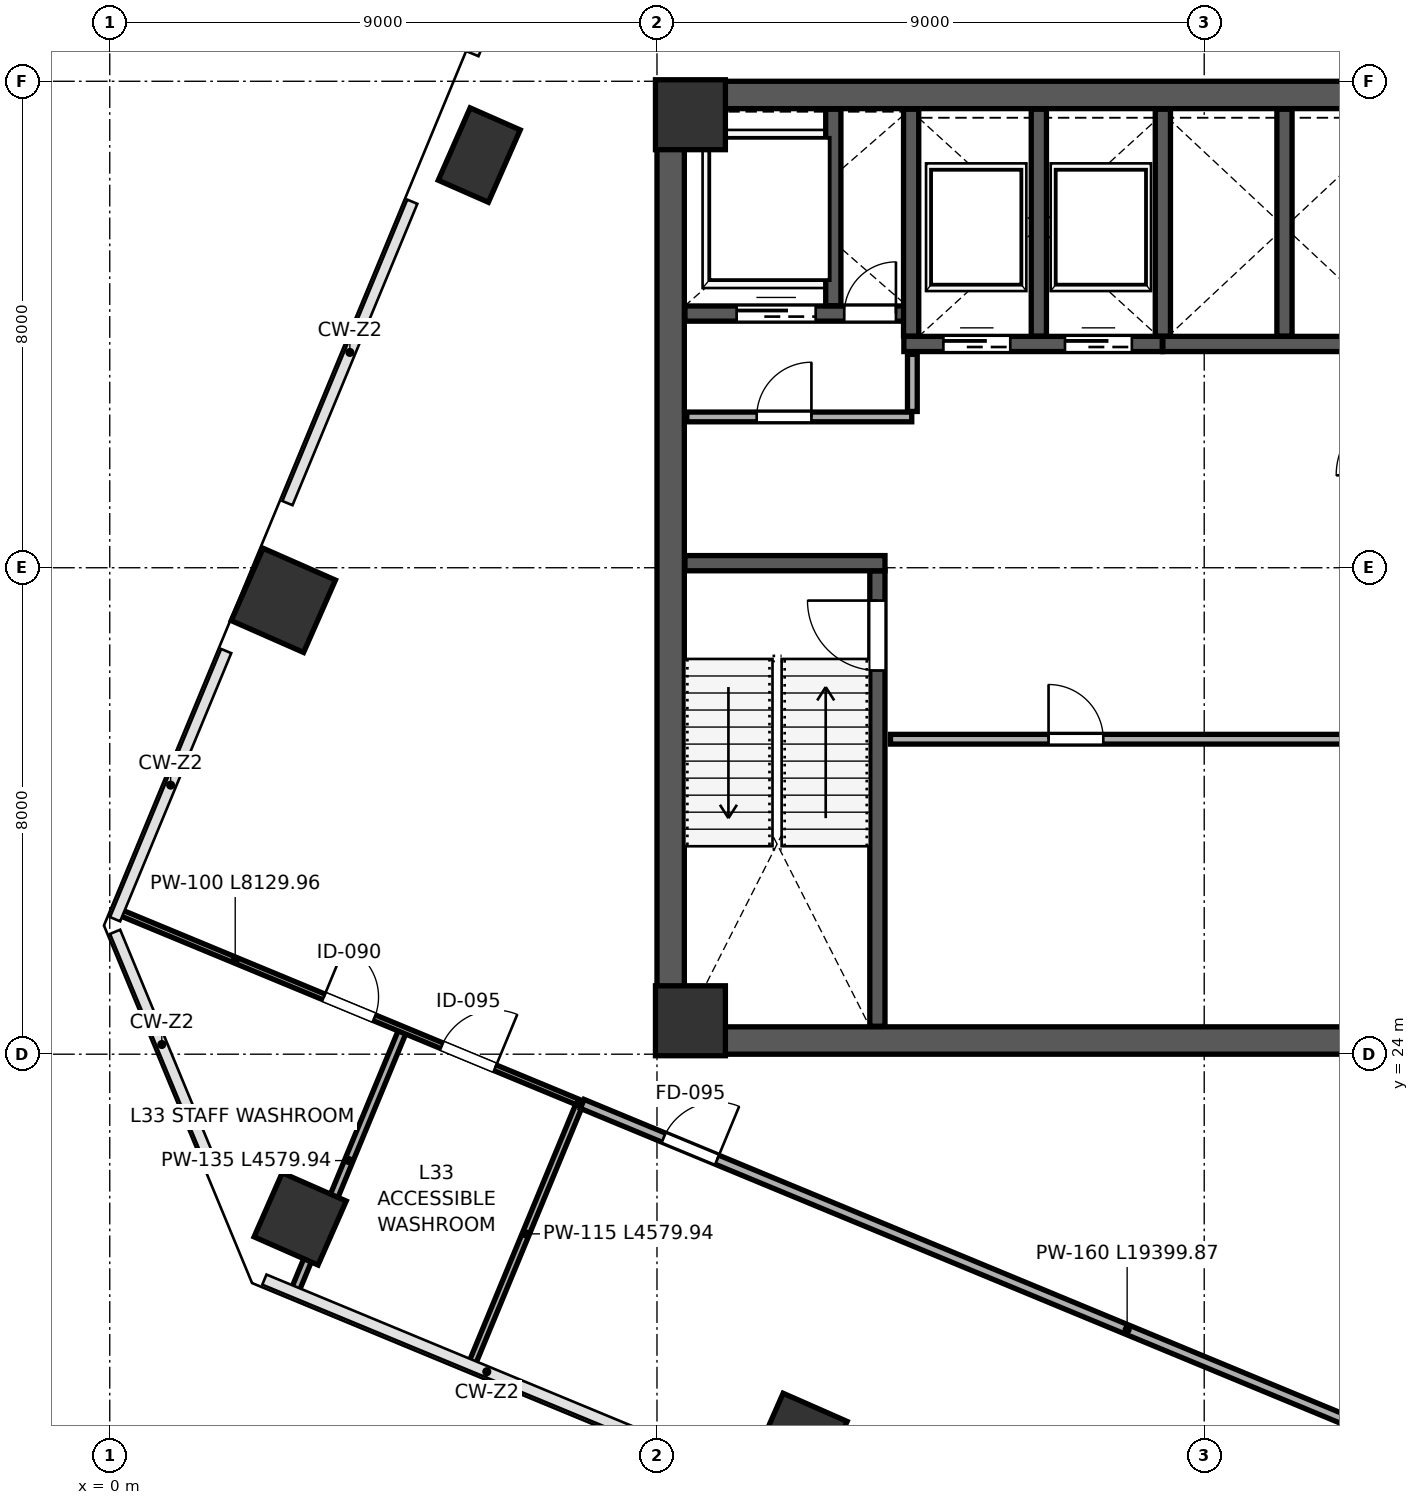
"""IFC4 building model, lengths in metres.
Left out: names, types, materials, properties, quantities, classifications, styles, units other than length and angle.
Written with IfcOpenShell. Run it as: python <this file> out.ifc"""

import sys

from ifc_helpers import new_model, si_unit, direction, frame, frame_2d, origin, origin_2d, place, context, subcontext, project, spatial, rectangle, extrude, clip, halfspace, source, transform, mapped, element, fill, save


model = new_model("IFC4")
c1 = context("Model", 3, precision=1e-05, world=origin(), true_north=direction((0.0, 1.0)))
c2 = subcontext(c1, "Body", "Model", "MODEL_VIEW")
j1 = project(units=[si_unit("LENGTHUNIT", "METRE"), si_unit("PLANEANGLEUNIT", "RADIAN")], contexts=[c1])
p1 = place(None, origin())
s1 = spatial("IfcSite", under=j1, at=p1, CompositionType="ELEMENT")
p2 = place(p1, origin())
s2 = spatial("IfcBuilding", under=s1, at=p2, CompositionType="ELEMENT")
p3 = place(p2, frame((0.0, 0.0, 149.8)))
s3 = spatial("IfcBuildingStorey", under=s2, at=p3, CompositionType="ELEMENT", Elevation=149.8)
m1 = source(origin(), c2, "Body", "SweptSolid", [
    extrude(rectangle(XDim=1.15, YDim=1.15, at=origin_2d()), origin(), (0.0, 0.0, 1.0), 4.198),
])
for number, where, z_axis, x_axis in (
    (1, (9.55, 24.55, 0.001), (0.0, 0.0, 1.0), (1.0, 0.0, 0.0)),
    (2, (9.55, 39.45, 0.001), (0.0, 0.0, 1.0), (1.0, 0.0, 0.0)),
):
    element("IfcColumn", number, at=place(p3, frame(where, z_axis=z_axis, x_axis=x_axis)), inside=s3, PredefinedType="COLUMN", context=c2, shape_type="MappedRepresentation", body=[
        mapped(m1, transform((0.0, 0.0, 0.0), scale=1.0)),
    ])
p4 = place(p3, frame((3.131, 21.291, 0.0), z_axis=(-0.054253829771, 0.095391983974, 0.993960206119), x_axis=(0.993538038075, 0.104540497944, 0.044197864073)))
e3 = element("IfcColumn", 3, at=p4, inside=s3, PredefinedType="COLUMN", context=c2, shape_type="Clipping", body=[
    clip(clip(extrude(rectangle(XDim=1.15, YDim=1.15, at=origin_2d()), origin(), (0.0, 0.0, 1.0), 4.226), halfspace(frame((0.0, 0.0, 0.084), z_axis=(0.0, 0.0, -1.0), x_axis=(1.0, 0.0, 0.0)), False)), halfspace(frame((0.0, 0.0, 4.141), z_axis=(0.0, 0.0, 1.0), x_axis=(1.0, 0.0, 0.0)), False)),
])
p5 = place(p3, frame((11.369, 17.666, 0.0), z_axis=(-0.073577292822, 0.053200261293, 0.995869526685), x_axis=(0.86133259686, 0.506723750126, 0.036567726806)))
e4 = element("IfcColumn", 4, at=p5, inside=s3, PredefinedType="COLUMN", context=c2, shape_type="Clipping", body=[
    clip(clip(extrude(rectangle(XDim=1.15, YDim=1.15, at=origin_2d()), origin(), (0.0, 0.0, 1.0), 4.217), halfspace(frame((0.0, 0.0, 0.07), z_axis=(0.0, 0.0, -1.0), x_axis=(1.0, 0.0, 0.0)), False)), halfspace(frame((0.0, 0.0, 4.147), z_axis=(0.0, 0.0, 1.0), x_axis=(1.0, 0.0, 0.0)), False)),
])
p6 = place(p3, frame((2.855, 31.464, 0.0), z_axis=(-0.001677900232, 0.096392475377, 0.995341989138), x_axis=(0.922149724139, -0.384879593254, 0.038827631481)))
e5 = element("IfcColumn", 5, at=p6, inside=s3, PredefinedType="COLUMN", context=c2, shape_type="Clipping", body=[
    clip(clip(extrude(rectangle(XDim=1.3, YDim=1.3, at=origin_2d()), origin(), (0.0, 0.0, 1.0), 4.22), halfspace(frame((0.0, 0.0, 0.084), z_axis=(0.0, 0.0, -1.0), x_axis=(1.0, 0.0, 0.0)), False)), halfspace(frame((0.0, 0.0, 4.136), z_axis=(0.0, 0.0, 1.0), x_axis=(1.0, 0.0, 0.0)), False)),
])
p7 = place(p3, frame((6.077, 38.786, 0.0), z_axis=(0.036018819674, 0.079391964265, 0.996192531913), x_axis=(0.667777192971, -0.743532643581, 0.035111657288)))
e6 = element("IfcColumn", 6, at=p7, inside=s3, PredefinedType="PILASTER", context=c2, shape_type="Clipping", body=[
    clip(clip(extrude(rectangle(XDim=0.9, YDim=1.3, at=origin_2d()), origin(), (0.0, 0.0, 1.0), 4.216), halfspace(frame((0.0, 0.0, 0.069), z_axis=(0.0, 0.0, -1.0), x_axis=(1.0, 0.0, 0.0)), False)), halfspace(frame((0.0, 0.0, 4.147), z_axis=(0.0, 0.0, 1.0), x_axis=(1.0, 0.0, 0.0)), False)),
])
p8 = place(p3, frame((9.225, 24.45, 0.0), z_axis=(0.0, 0.0, 1.0), x_axis=(0.0, 1.0, 0.0)))
e7 = element("IfcWall", 7, at=p8, inside=s3, PredefinedType="SHEAR", context=c2, shape_type="SweptSolid", body=[
    extrude(rectangle(XDim=15.1, YDim=0.45, at=frame_2d((7.55, 0.0))), origin(), (0.0, 0.0, 1.0), 3.96),
])
for number, where, z_axis, x_axis in (
    (8, (9.0, 24.225, 0.0), (0.0, 0.0, 1.0), (1.0, 0.0, 0.0)),
    (9, (9.0, 39.775, 0.0), (0.0, 0.0, 1.0), (1.0, 0.0, 0.0)),
):
    element("IfcWall", number, at=place(p3, frame(where, z_axis=z_axis, x_axis=x_axis)), inside=s3, PredefinedType="SHEAR", context=c2, shape_type="SweptSolid", body=[
        extrude(rectangle(XDim=18.0, YDim=0.45, at=frame_2d((9.0, 0.0))), origin(), (0.0, 0.0, 1.0), 3.96),
    ])
p9 = place(p3, frame((12.625, 24.46, 0.0), z_axis=(0.0, 0.0, 1.0), x_axis=(0.0, 1.0, 0.0)))
e10 = element("IfcWall", 10, at=p9, inside=s3, PredefinedType="SHEAR", context=c2, shape_type="SweptSolid", body=[
    extrude(rectangle(XDim=7.49, YDim=0.25, at=frame_2d((3.745, 0.0))), origin(), (0.0, 0.0, 1.0), 3.96),
])
p10 = place(p9, frame((5.85, 0.0, 0.0)))
e11 = element("IfcOpeningElement", 11, at=p10, cuts=e10, PredefinedType="OPENING", context=c2, shape_type="SweptSolid", body=[
    extrude(rectangle(XDim=1.15, YDim=2.2, at=frame_2d((0.575, 1.1))), frame((0.0, 0.135, 0.0), z_axis=(0.0, -1.0, 0.0), x_axis=(1.0, 0.0, 0.0)), (0.0, 0.0, 1.0), 0.27),
])
p11 = place(p3, frame((9.46, 32.075, 0.0), z_axis=(0.0, 0.0, 1.0), x_axis=(1.0, 0.0, 0.0)))
e12 = element("IfcWall", 12, at=p11, inside=s3, PredefinedType="SHEAR", context=c2, shape_type="SweptSolid", body=[
    extrude(rectangle(XDim=3.29, YDim=0.25, at=frame_2d((1.645, 0.0))), origin(), (0.0, 0.0, 1.0), 3.96),
])
p12 = place(p3, frame((9.46, 36.18, 0.0), z_axis=(0.0, 0.0, 1.0), x_axis=(1.0, 0.0, 0.0)))
e13 = element("IfcWall", 13, at=p12, inside=s3, PredefinedType="SHEAR", context=c2, shape_type="SweptSolid", body=[
    extrude(rectangle(XDim=3.79, YDim=0.25, at=frame_2d((1.895, 0.0))), origin(), (0.0, 0.0, 1.0), 3.96),
])
p13 = place(p12, frame((2.62, 0.0, 0.0)))
e14 = element("IfcOpeningElement", 14, at=p13, cuts=e13, PredefinedType="OPENING", context=c2, shape_type="SweptSolid", body=[
    extrude(rectangle(XDim=0.85, YDim=2.1, at=frame_2d((0.425, 1.05))), frame((0.0, 0.135, 0.0), z_axis=(0.0, -1.0, 0.0), x_axis=(1.0, 0.0, 0.0)), (0.0, 0.0, 1.0), 0.27),
])
p14 = place(p12, frame((0.85, 0.0, 0.0)))
e15 = element("IfcOpeningElement", 15, at=p14, cuts=e13, PredefinedType="OPENING", context=c2, shape_type="SweptSolid", body=[
    extrude(rectangle(XDim=1.3, YDim=2.25, at=frame_2d((0.65, 1.125))), frame((0.0, 0.135, 0.0), z_axis=(0.0, -1.0, 0.0), x_axis=(1.0, 0.0, 0.0)), (0.0, 0.0, 1.0), 0.27),
])
p15 = place(p3, frame((11.9, 36.31, 0.0), z_axis=(0.0, 0.0, 1.0), x_axis=(0.0, 1.0, 0.0)))
e16 = element("IfcWall", 16, at=p15, inside=s3, PredefinedType="SHEAR", context=c2, shape_type="SweptSolid", body=[
    extrude(rectangle(XDim=3.23, YDim=0.25, at=frame_2d((1.615, 0.0))), origin(), (0.0, 0.0, 1.0), 3.96),
])
p16 = place(p3, frame((13.06, 35.68, 0.0), z_axis=(0.0, 0.0, 1.0), x_axis=(1.0, 0.0, 0.0)))
e17 = element("IfcWall", 17, at=p16, inside=s3, PredefinedType="SHEAR", context=c2, shape_type="SweptSolid", body=[
    extrude(rectangle(XDim=4.25, YDim=0.25, at=frame_2d((2.125, 0.0))), origin(), (0.0, 0.0, 1.0), 3.96),
])
p17 = place(p16, frame((0.65, 0.0, 0.0)))
e18 = element("IfcOpeningElement", 18, at=p17, cuts=e17, PredefinedType="OPENING", context=c2, shape_type="SweptSolid", body=[
    extrude(rectangle(XDim=1.1, YDim=2.2, at=frame_2d((0.55, 1.1))), frame((0.0, 0.135, 0.0), z_axis=(0.0, -1.0, 0.0), x_axis=(1.0, 0.0, 0.0)), (0.0, 0.0, 1.0), 0.27),
])
p18 = place(p16, frame((2.65, 0.0, 0.0)))
e19 = element("IfcOpeningElement", 19, at=p18, cuts=e17, PredefinedType="OPENING", context=c2, shape_type="SweptSolid", body=[
    extrude(rectangle(XDim=1.1, YDim=2.2, at=frame_2d((0.55, 1.1))), frame((0.0, 0.135, 0.0), z_axis=(0.0, -1.0, 0.0), x_axis=(1.0, 0.0, 0.0)), (0.0, 0.0, 1.0), 0.27),
])
for number, where, z_axis, x_axis in (
    (20, (13.18, 35.81, 0.0), (0.0, 0.0, 1.0), (0.0, 1.0, 0.0)),
    (21, (15.28, 35.81, 0.0), (0.0, 0.0, 1.0), (0.0, 1.0, 0.0)),
):
    element("IfcWall", number, at=place(p3, frame(where, z_axis=z_axis, x_axis=x_axis)), inside=s3, PredefinedType="SHEAR", context=c2, shape_type="SweptSolid", body=[
        extrude(rectangle(XDim=3.73, YDim=0.25, at=frame_2d((1.865, 0.0))), origin(), (0.0, 0.0, 1.0), 3.96),
    ])
p19 = place(p3, frame((17.32, 35.68, 0.0), z_axis=(0.0, 0.0, 1.0), x_axis=(1.0, 0.0, 0.0)))
e22 = element("IfcWall", 22, at=p19, inside=s3, PredefinedType="SHEAR", context=c2, shape_type="SweptSolid", body=[
    extrude(rectangle(XDim=3.87, YDim=0.25, at=frame_2d((1.935, 0.0))), origin(), (0.0, 0.0, 1.0), 3.96),
])
for number, where, z_axis, x_axis in (
    (23, (17.32, 35.81, 0.0), (0.0, 0.0, 1.0), (0.0, 1.0, 0.0)),
    (24, (19.32, 35.81, 0.0), (0.0, 0.0, 1.0), (0.0, 1.0, 0.0)),
):
    element("IfcWall", number, at=place(p3, frame(where, z_axis=z_axis, x_axis=x_axis)), inside=s3, PredefinedType="SHEAR", context=c2, shape_type="SweptSolid", body=[
        extrude(rectangle(XDim=3.73, YDim=0.25, at=frame_2d((1.865, 0.0))), origin(), (0.0, 0.0, 1.0), 3.96),
    ])
p20 = place(p3, frame((9.49, 34.48, 0.0), z_axis=(0.0, 0.0, 1.0), x_axis=(1.0, 0.0, 0.0)))
e25 = element("IfcWall", 25, at=p20, inside=s3, PredefinedType="PARTITIONING", context=c2, shape_type="SweptSolid", body=[
    extrude(rectangle(XDim=3.7, YDim=0.16, at=frame_2d((1.85, 0.0))), origin(), (0.0, 0.0, 1.0), 3.96),
])
p21 = place(p20, frame((1.15, 0.0, 0.0)))
e26 = element("IfcOpeningElement", 26, at=p21, cuts=e25, PredefinedType="OPENING", context=c2, shape_type="SweptSolid", body=[
    extrude(rectangle(XDim=0.9, YDim=2.15, at=frame_2d((0.45, 1.075))), frame((0.0, 0.09, 0.0), z_axis=(0.0, -1.0, 0.0), x_axis=(1.0, 0.0, 0.0)), (0.0, 0.0, 1.0), 0.18),
])
p22 = place(p3, frame((13.2, 34.57, 0.0), z_axis=(0.0, 0.0, 1.0), x_axis=(0.0, 1.0, 0.0)))
e27 = element("IfcWall", 27, at=p22, inside=s3, PredefinedType="PARTITIONING", context=c2, shape_type="SweptSolid", body=[
    extrude(rectangle(XDim=0.94, YDim=0.16, at=frame_2d((0.47, 0.0))), origin(), (0.0, 0.0, 1.0), 3.96),
])
p23 = place(p3, frame((12.84, 29.18, 0.0), z_axis=(0.0, 0.0, 1.0), x_axis=(1.0, 0.0, 0.0)))
e28 = element("IfcWall", 28, at=p23, inside=s3, PredefinedType="PARTITIONING", context=c2, shape_type="SweptSolid", body=[
    extrude(rectangle(XDim=8.37, YDim=0.16, at=frame_2d((4.185, 0.0))), origin(), (0.0, 0.0, 1.0), 3.96),
])
p24 = place(p23, frame((2.6, 0.0, 0.0)))
e29 = element("IfcOpeningElement", 29, at=p24, cuts=e28, PredefinedType="OPENING", context=c2, shape_type="SweptSolid", body=[
    extrude(rectangle(XDim=0.9, YDim=2.15, at=frame_2d((0.45, 1.075))), frame((0.0, 0.09, 0.0), z_axis=(0.0, -1.0, 0.0), x_axis=(1.0, 0.0, 0.0)), (0.0, 0.0, 1.0), 0.18),
])
p25 = place(p3, frame((3.055, 20.135, 0.0), z_axis=(0.0, 0.0, 1.0), x_axis=(0.382676631985, 0.923882349292, 0.0)))
e30 = element("IfcWall", 30, at=p25, inside=s3, PredefinedType="PARTITIONING", context=c2, shape_type="SweptSolid", body=[
    extrude(rectangle(XDim=4.58, YDim=0.135, at=frame_2d((2.29, 0.0))), origin(), (0.0, 0.0, 1.0), 3.195),
])
p26 = place(p3, frame((5.966, 18.93, 0.0), z_axis=(0.0, 0.0, 1.0), x_axis=(0.382676631985, 0.923882349292, 0.0)))
e31 = element("IfcWall", 31, at=p26, inside=s3, PredefinedType="PARTITIONING", context=c2, shape_type="SweptSolid", body=[
    extrude(rectangle(XDim=4.58, YDim=0.115, at=frame_2d((2.29, 0.0))), origin(), (0.0, 0.0, 1.0), 3.195),
])
p27 = place(p3, frame((0.186, 26.325, 0.0), z_axis=(0.0, 0.0, 1.0), x_axis=(0.923871890562, -0.382701881142, 0.0)))
e32 = element("IfcWall", 32, at=p27, inside=s3, PredefinedType="PARTITIONING", context=c2, shape_type="SweptSolid", body=[
    extrude(rectangle(XDim=8.13, YDim=0.1, at=frame_2d((4.065, 0.0))), origin(), (0.0, 0.0, 1.0), 3.96),
])
p28 = place(p27, frame((3.61, 0.0, 0.0)))
e33 = element("IfcOpeningElement", 33, at=p28, cuts=e32, PredefinedType="OPENING", context=c2, shape_type="SweptSolid", body=[
    extrude(rectangle(XDim=0.9, YDim=2.15, at=frame_2d((0.45, 1.075))), frame((0.0, 0.06, 0.0), z_axis=(0.0, -1.0, 0.0), x_axis=(1.0, 0.0, 0.0)), (0.0, 0.0, 1.0), 0.12),
])
p29 = place(p27, frame((5.71, 0.0, 0.0)))
e34 = element("IfcOpeningElement", 34, at=p29, cuts=e32, PredefinedType="OPENING", context=c2, shape_type="SweptSolid", body=[
    extrude(rectangle(XDim=0.95, YDim=2.15, at=frame_2d((0.475, 1.075))), frame((0.0, 0.06, 0.0), z_axis=(0.0, -1.0, 0.0), x_axis=(1.0, 0.0, 0.0)), (0.0, 0.0, 1.0), 0.12),
])
p30 = place(p3, frame((7.771, 23.183, 0.0), z_axis=(0.0, 0.0, 1.0), x_axis=(0.923878020857, -0.382687081801, 0.0)))
e35 = element("IfcWall", 35, at=p30, inside=s3, PredefinedType="PARTITIONING", context=c2, shape_type="SweptSolid", body=[
    extrude(rectangle(XDim=19.4, YDim=0.16, at=frame_2d((9.7, 0.0))), origin(), (0.0, 0.0, 1.0), 3.96),
])
p31 = place(p30, frame((1.45, 0.0, 0.0)))
e36 = element("IfcOpeningElement", 36, at=p31, cuts=e35, PredefinedType="OPENING", context=c2, shape_type="SweptSolid", body=[
    extrude(rectangle(XDim=0.95, YDim=2.15, at=frame_2d((0.475, 1.075))), frame((0.0, 0.09, 0.0), z_axis=(0.0, -1.0, 0.0), x_axis=(1.0, 0.0, 0.0)), (0.0, 0.0, 1.0), 0.18),
])
p32 = place(p3, frame((9.523, 48.867, 0.0), z_axis=(0.0, 0.0, 1.0), x_axis=(0.923882225555, -0.382676930718, 0.0)))
e37 = element("IfcWall", 37, at=p32, inside=s3, PredefinedType="PARTITIONING", context=c2, shape_type="SweptSolid", body=[
    extrude(rectangle(XDim=27.61, YDim=0.115, at=frame_2d((13.805, 0.0))), origin(), (0.0, 0.0, 1.0), 3.96),
])
p33 = place(p32, frame((20.31, 0.0, 0.0)))
e38 = element("IfcOpeningElement", 38, at=p33, cuts=e37, PredefinedType="OPENING", context=c2, shape_type="SweptSolid", body=[
    extrude(rectangle(XDim=0.95, YDim=2.15, at=frame_2d((0.475, 1.075))), frame((0.0, 0.067, 0.0), z_axis=(0.0, -1.0, 0.0), x_axis=(1.0, 0.0, 0.0)), (0.0, 0.0, 1.0), 0.135),
])
m2 = source(origin(), c2, "Body", "SweptSolid", [
    extrude(rectangle(XDim=1.15, YDim=2.2, at=frame_2d((0.575, 1.1))), frame((0.0, 0.025, 0.0), z_axis=(0.0, -1.0, 0.0), x_axis=(1.0, 0.0, 0.0)), (0.0, 0.0, 1.0), 0.05),
])
p34 = place(p10, origin())
e39 = element("IfcDoor", 39, at=p34, inside=s3, OperationType="SINGLE_SWING_RIGHT", PredefinedType="DOOR", context=c2, shape_type="MappedRepresentation", body=[
    mapped(m2, transform((0.0, 0.0, 0.0), scale=1.0)),
])
fill(e11, e39)
m3 = source(origin(), c2, "Body", "SweptSolid", [
    extrude(rectangle(XDim=0.85, YDim=2.1, at=frame_2d((0.425, 1.05))), frame((0.0, 0.025, 0.0), z_axis=(0.0, -1.0, 0.0), x_axis=(1.0, 0.0, 0.0)), (0.0, 0.0, 1.0), 0.05),
])
p35 = place(p13, origin())
e40 = element("IfcDoor", 40, at=p35, inside=s3, OperationType="SINGLE_SWING_RIGHT", PredefinedType="DOOR", context=c2, shape_type="MappedRepresentation", body=[
    mapped(m3, transform((0.0, 0.0, 0.0), scale=1.0)),
])
fill(e14, e40)
m4 = source(origin(), c2, "Body", "SweptSolid", [
    extrude(rectangle(XDim=1.1, YDim=2.2, at=frame_2d((0.55, 1.1))), frame((0.0, 0.025, 0.0), z_axis=(0.0, -1.0, 0.0), x_axis=(1.0, 0.0, 0.0)), (0.0, 0.0, 1.0), 0.05),
])
p36 = place(p17, origin())
e41 = element("IfcDoor", 41, at=p36, inside=s3, OperationType="SLIDING_TO_LEFT", PredefinedType="DOOR", context=c2, shape_type="MappedRepresentation", body=[
    mapped(m4, transform((0.0, 0.0, 0.0), scale=1.0)),
])
fill(e18, e41)
p37 = place(p18, origin())
e42 = element("IfcDoor", 42, at=p37, inside=s3, OperationType="SLIDING_TO_RIGHT", PredefinedType="DOOR", context=c2, shape_type="MappedRepresentation", body=[
    mapped(m4, transform((0.0, 0.0, 0.0), scale=1.0)),
])
fill(e19, e42)
m5 = source(origin(), c2, "Body", "SweptSolid", [
    extrude(rectangle(XDim=1.3, YDim=2.25, at=frame_2d((0.65, 1.125))), frame((0.0, 0.025, 0.0), z_axis=(0.0, -1.0, 0.0), x_axis=(1.0, 0.0, 0.0)), (0.0, 0.0, 1.0), 0.05),
])
p38 = place(p14, origin())
e43 = element("IfcDoor", 43, at=p38, inside=s3, OperationType="SLIDING_TO_LEFT", PredefinedType="DOOR", context=c2, shape_type="MappedRepresentation", body=[
    mapped(m5, transform((0.0, 0.0, 0.0), scale=1.0)),
])
fill(e15, e43)
m6 = source(origin(), c2, "Body", "SweptSolid", [
    extrude(rectangle(XDim=0.9, YDim=2.15, at=frame_2d((0.45, 1.075))), frame((0.0, 0.025, 0.0), z_axis=(0.0, -1.0, 0.0), x_axis=(1.0, 0.0, 0.0)), (0.0, 0.0, 1.0), 0.05),
])
p39 = place(p21, origin())
e44 = element("IfcDoor", 44, at=p39, inside=s3, OperationType="SINGLE_SWING_RIGHT", PredefinedType="DOOR", context=c2, shape_type="MappedRepresentation", body=[
    mapped(m6, transform((0.0, 0.0, 0.0), scale=1.0)),
])
fill(e26, e44)
p40 = place(p24, origin())
e45 = element("IfcDoor", 45, at=p40, inside=s3, OperationType="SINGLE_SWING_LEFT", PredefinedType="DOOR", context=c2, shape_type="MappedRepresentation", body=[
    mapped(m6, transform((0.0, 0.0, 0.0), scale=1.0)),
])
fill(e29, e45)
m7 = source(origin(), c2, "Body", "SweptSolid", [
    extrude(rectangle(XDim=0.9, YDim=2.15, at=frame_2d((0.45, 1.075))), frame((0.0, 0.025, 0.0), z_axis=(0.0, -1.0, 0.0), x_axis=(1.0, 0.0, 0.0)), (0.0, 0.0, 1.0), 0.05),
])
p41 = place(p28, origin())
e46 = element("IfcDoor", 46, at=p41, inside=s3, OperationType="SINGLE_SWING_LEFT", PredefinedType="DOOR", context=c2, shape_type="MappedRepresentation", body=[
    mapped(m7, transform((0.0, 0.0, 0.0), scale=1.0)),
])
fill(e33, e46)
m8 = source(origin(), c2, "Body", "SweptSolid", [
    extrude(rectangle(XDim=0.95, YDim=2.15, at=frame_2d((0.475, 1.075))), frame((0.0, 0.025, 0.0), z_axis=(0.0, -1.0, 0.0), x_axis=(1.0, 0.0, 0.0)), (0.0, 0.0, 1.0), 0.05),
])
p42 = place(p29, origin())
e47 = element("IfcDoor", 47, at=p42, inside=s3, OperationType="SINGLE_SWING_RIGHT", PredefinedType="DOOR", context=c2, shape_type="MappedRepresentation", body=[
    mapped(m8, transform((0.0, 0.0, 0.0), scale=1.0)),
])
fill(e34, e47)
m9 = source(origin(), c2, "Body", "SweptSolid", [
    extrude(rectangle(XDim=0.95, YDim=2.15, at=frame_2d((0.475, 1.075))), frame((0.0, 0.025, 0.0), z_axis=(0.0, -1.0, 0.0), x_axis=(1.0, 0.0, 0.0)), (0.0, 0.0, 1.0), 0.05),
])
p43 = place(p31, origin())
e48 = element("IfcDoor", 48, at=p43, inside=s3, OperationType="SINGLE_SWING_RIGHT", PredefinedType="DOOR", context=c2, shape_type="MappedRepresentation", body=[
    mapped(m9, transform((0.0, 0.0, 0.0), scale=1.0)),
])
fill(e36, e48)
save(model, sys.argv[1])
